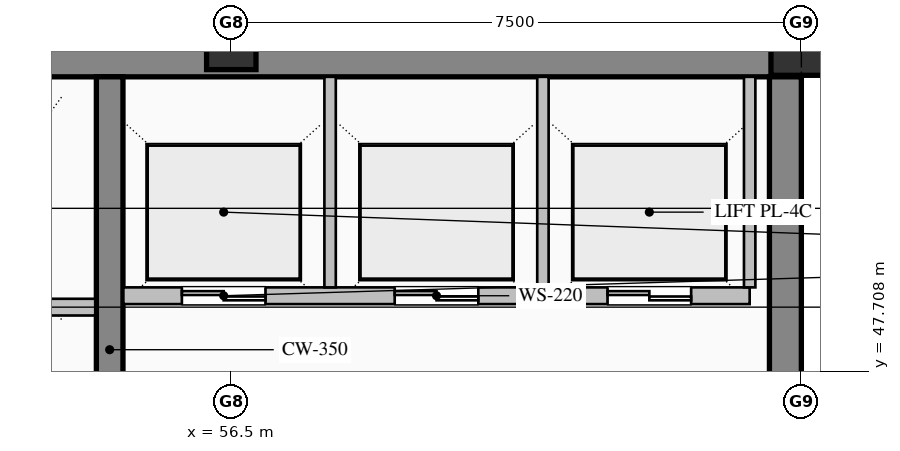
"""IFC4 building model, lengths in metres.
Left out: names, types, materials, properties, quantities, classifications, styles, units other than length and angle.
Written with IfcOpenShell. Run it as: python <this file> out.ifc"""

import sys

from ifc_helpers import new_model, si_unit, direction, frame, frame_2d, origin, origin_2d, place, context, subcontext, project, spatial, rectangle, hollow_rectangle, extrude, element, fill, save


model = new_model("IFC4")
c1 = context("Model", 3, precision=1e-05, world=origin(), true_north=direction((0.0, 1.0)))
c2 = subcontext(c1, "Body", "Model", "MODEL_VIEW")
j1 = project(units=[si_unit("LENGTHUNIT", "METRE"), si_unit("PLANEANGLEUNIT", "RADIAN")], contexts=[c1])
p1 = place(None, origin())
s1 = spatial("IfcSite", under=j1, at=p1, CompositionType="ELEMENT")
p2 = place(p1, origin())
s2 = spatial("IfcBuilding", under=s1, at=p2, CompositionType="ELEMENT")
p3 = place(p2, frame((0.0, 0.0, 343.2)))
s3 = spatial("IfcBuildingStorey", under=s2, at=p3, CompositionType="ELEMENT", Elevation=343.2)
p4 = place(p3, frame((40.5, 51.79, 0.0), z_axis=(0.0, 0.0, 1.0), x_axis=(1.0, 0.0, 0.0)))
e1 = element("IfcWall", 1, at=p4, inside=s3, PredefinedType="SHEAR", context=c2, shape_type="SweptSolid", body=[
    extrude(rectangle(XDim=23.5, YDim=0.42, at=frame_2d((11.75, 0.0))), origin(), (0.0, 0.0, 1.0), 3.785),
])
p5 = place(p3, frame((63.79, 36.32, 0.0), z_axis=(0.0, 0.0, 1.0), x_axis=(0.0, 1.0, 0.0)))
e2 = element("IfcWall", 2, at=p5, inside=s3, PredefinedType="SHEAR", context=c2, shape_type="SweptSolid", body=[
    extrude(rectangle(XDim=15.26, YDim=0.42, at=frame_2d((7.63, 0.0))), origin(), (0.0, 0.0, 1.0), 3.785),
])
p6 = place(p3, frame((54.9, 44.4, 0.0), z_axis=(0.0, 0.0, 1.0), x_axis=(0.0, 1.0, 0.0)))
e3 = element("IfcWall", 3, at=p6, inside=s3, PredefinedType="SHEAR", context=c2, shape_type="SweptSolid", body=[
    extrude(rectangle(XDim=7.18, YDim=0.35, at=frame_2d((3.59, 0.0))), origin(), (0.0, 0.0, 1.0), 3.785),
])
p7 = place(p3, frame((56.5, 52.0, 0.0), z_axis=(0.0, 0.0, 1.0), x_axis=(1.0, 0.0, 0.0)))
e4 = element("IfcColumn", 4, at=p7, inside=s3, PredefinedType="COLUMN", context=c2, shape_type="SweptSolid", body=[
    extrude(hollow_rectangle(XDim=0.65, YDim=0.65, WallThickness=0.028, at=origin_2d()), origin(), (0.0, 0.0, 1.0), 4.0),
])
p8 = place(p3, frame((64.0, 52.0, 0.0), z_axis=(0.0, 0.0, 1.0), x_axis=(1.0, 0.0, 0.0)))
e5 = element("IfcColumn", 5, at=p8, inside=s3, PredefinedType="COLUMN", context=c2, shape_type="SweptSolid", body=[
    extrude(hollow_rectangle(XDim=0.8, YDim=0.8, WallThickness=0.032, at=origin_2d()), origin(), (0.0, 0.0, 1.0), 4.0),
])
p9 = place(p3, frame((54.71, 48.55, 0.0), z_axis=(0.0, 0.0, 1.0), x_axis=(-1.0, 0.0, 0.0)))
e6 = element("IfcWall", 6, at=p9, inside=s3, PredefinedType="PARTITIONING", context=c2, shape_type="SweptSolid", body=[
    extrude(rectangle(XDim=5.12, YDim=0.22, at=frame_2d((2.56, 0.0))), origin(), (0.0, 0.0, 1.0), 3.785),
])
p10 = place(p9, frame((3.735, 0.0, 0.0)))
e7 = element("IfcOpeningElement", 7, at=p10, cuts=e6, PredefinedType="OPENING", context=c2, shape_type="SweptSolid", body=[
    extrude(rectangle(XDim=1.15, YDim=2.2, at=frame_2d((0.575, 1.1))), frame((0.0, 0.12, 0.0), z_axis=(0.0, -1.0, 0.0), x_axis=(1.0, 0.0, 0.0)), (0.0, 0.0, 1.0), 0.24),
])
p11 = place(p9, frame((0.935, 0.0, 0.0)))
e8 = element("IfcOpeningElement", 8, at=p11, cuts=e6, PredefinedType="OPENING", context=c2, shape_type="SweptSolid", body=[
    extrude(rectangle(XDim=1.15, YDim=2.2, at=frame_2d((0.575, 1.1))), frame((0.0, 0.12, 0.0), z_axis=(0.0, -1.0, 0.0), x_axis=(1.0, 0.0, 0.0)), (0.0, 0.0, 1.0), 0.24),
])
p12 = place(p3, frame((63.32, 48.7, 0.0), z_axis=(0.0, 0.0, 1.0), x_axis=(-1.0, 0.0, 0.0)))
e9 = element("IfcWall", 9, at=p12, inside=s3, PredefinedType="PARTITIONING", context=c2, shape_type="SweptSolid", body=[
    extrude(rectangle(XDim=8.24, YDim=0.22, at=frame_2d((4.12, 0.0))), origin(), (0.0, 0.0, 1.0), 3.785),
])
p13 = place(p12, frame((6.37, 0.0, 0.0)))
e10 = element("IfcOpeningElement", 10, at=p13, cuts=e9, PredefinedType="OPENING", context=c2, shape_type="SweptSolid", body=[
    extrude(rectangle(XDim=1.1, YDim=2.2, at=frame_2d((0.55, 1.1))), frame((0.0, 0.12, 0.0), z_axis=(0.0, -1.0, 0.0), x_axis=(1.0, 0.0, 0.0)), (0.0, 0.0, 1.0), 0.24),
])
p14 = place(p12, frame((3.57, 0.0, 0.0)))
e11 = element("IfcOpeningElement", 11, at=p14, cuts=e9, PredefinedType="OPENING", context=c2, shape_type="SweptSolid", body=[
    extrude(rectangle(XDim=1.1, YDim=2.2, at=frame_2d((0.55, 1.1))), frame((0.0, 0.12, 0.0), z_axis=(0.0, -1.0, 0.0), x_axis=(1.0, 0.0, 0.0)), (0.0, 0.0, 1.0), 0.24),
])
p15 = place(p12, frame((0.77, 0.0, 0.0)))
e12 = element("IfcOpeningElement", 12, at=p15, cuts=e9, PredefinedType="OPENING", context=c2, shape_type="SweptSolid", body=[
    extrude(rectangle(XDim=1.1, YDim=2.2, at=frame_2d((0.55, 1.1))), frame((0.0, 0.12, 0.0), z_axis=(0.0, -1.0, 0.0), x_axis=(1.0, 0.0, 0.0)), (0.0, 0.0, 1.0), 0.24),
])
for number, where, z_axis, x_axis in (
    (13, (57.8, 48.81, 0.0), (0.0, 0.0, 1.0), (0.0, 1.0, 0.0)),
    (14, (60.6, 48.81, 0.0), (0.0, 0.0, 1.0), (0.0, 1.0, 0.0)),
    (15, (63.32, 48.81, 0.0), (0.0, 0.0, 1.0), (0.0, 1.0, 0.0)),
):
    element("IfcWall", number, at=place(p3, frame(where, z_axis=z_axis, x_axis=x_axis)), inside=s3, PredefinedType="PARTITIONING", context=c2, shape_type="SweptSolid", body=[
        extrude(rectangle(XDim=2.77, YDim=0.15, at=frame_2d((1.385, 0.0))), origin(), (0.0, 0.0, 1.0), 3.785),
    ])
p16 = place(p13, origin())
e16 = element("IfcDoor", 16, at=p16, inside=s3, OperationType="DOUBLE_DOOR_SLIDING", PredefinedType="DOOR", context=c2, shape_type="SweptSolid", body=[
    extrude(rectangle(XDim=1.1, YDim=2.2, at=frame_2d((0.55, 1.1))), frame((0.0, 0.025, 0.0), z_axis=(0.0, -1.0, 0.0), x_axis=(1.0, 0.0, 0.0)), (0.0, 0.0, 1.0), 0.05),
])
fill(e10, e16)
p17 = place(p14, origin())
e17 = element("IfcDoor", 17, at=p17, inside=s3, OperationType="DOUBLE_DOOR_SLIDING", PredefinedType="DOOR", context=c2, shape_type="SweptSolid", body=[
    extrude(rectangle(XDim=1.1, YDim=2.2, at=frame_2d((0.55, 1.1))), frame((0.0, 0.025, 0.0), z_axis=(0.0, -1.0, 0.0), x_axis=(1.0, 0.0, 0.0)), (0.0, 0.0, 1.0), 0.05),
])
fill(e11, e17)
p18 = place(p15, origin())
e18 = element("IfcDoor", 18, at=p18, inside=s3, OperationType="DOUBLE_DOOR_SLIDING", PredefinedType="DOOR", context=c2, shape_type="SweptSolid", body=[
    extrude(rectangle(XDim=1.1, YDim=2.2, at=frame_2d((0.55, 1.1))), frame((0.0, 0.025, 0.0), z_axis=(0.0, -1.0, 0.0), x_axis=(1.0, 0.0, 0.0)), (0.0, 0.0, 1.0), 0.05),
])
fill(e12, e18)
save(model, sys.argv[1])
